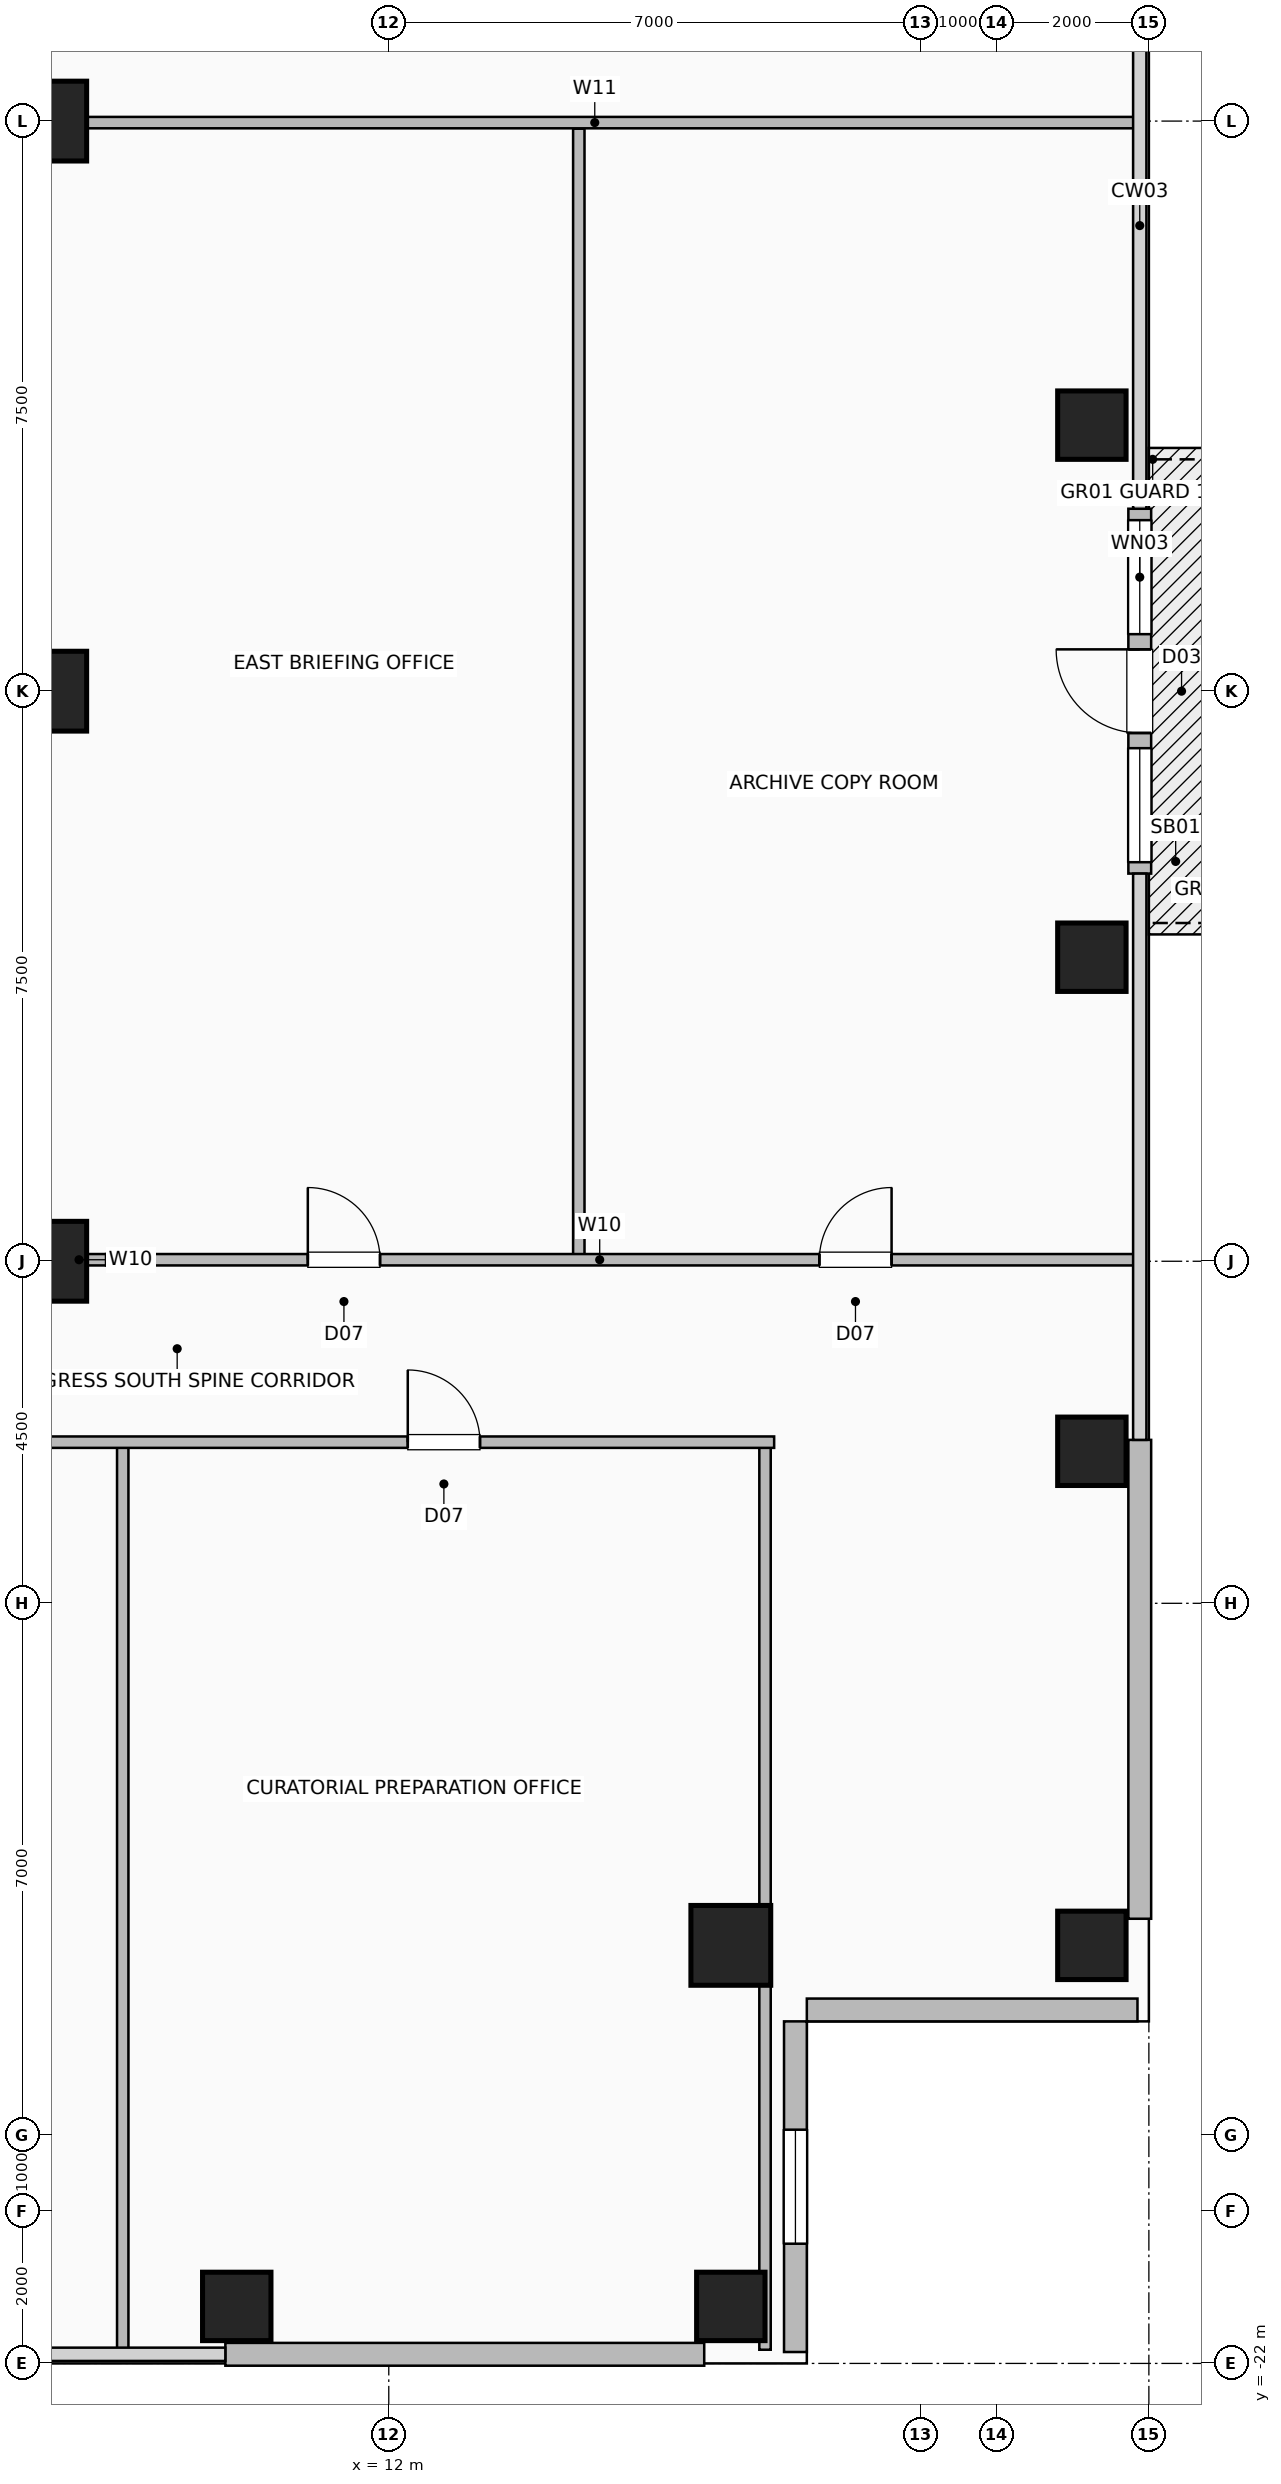
"""IFC4 building model, lengths in metres.
Left out: names, types, materials, properties, quantities, classifications, styles, units other than length and angle.
Written with IfcOpenShell. Run it as: python <this file> out.ifc"""

import sys

from ifc_helpers import new_model, si_unit, direction, frame, frame_2d, origin, origin_2d, place, context, subcontext, project, spatial, rectangle, hollow_rectangle, extrude, element, fill, save


model = new_model("IFC4")
c1 = context("Model", 3, precision=1e-05, world=origin(), true_north=direction((0.0, 1.0)))
c2 = subcontext(c1, "Body", "Model", "MODEL_VIEW")
j1 = project(units=[si_unit("LENGTHUNIT", "METRE"), si_unit("PLANEANGLEUNIT", "RADIAN")], contexts=[c1])
p1 = place(None, origin())
s1 = spatial("IfcSite", under=j1, at=p1, CompositionType="ELEMENT")
p2 = place(p1, origin())
s2 = spatial("IfcBuilding", under=s1, at=p2, CompositionType="ELEMENT")
p3 = place(p2, frame((0.0, 0.0, 144.4)))
s3 = spatial("IfcBuildingStorey", under=s2, at=p3, CompositionType="ELEMENT", Elevation=144.4)
for number, where, z_axis, x_axis in (
    (1, (7.5, -7.5, 0.0), (0.0, 0.0, 1.0), (1.0, 0.0, 0.0)),
    (2, (7.5, 0.0, 0.0), (0.0, 0.0, 1.0), (1.0, 0.0, 0.0)),
    (3, (7.5, 7.5, 0.0), (0.0, 0.0, 1.0), (1.0, 0.0, 0.0)),
):
    element("IfcColumn", number, at=place(p3, frame(where, z_axis=z_axis, x_axis=x_axis)), inside=s3, PredefinedType="COLUMN", context=c2, shape_type="SweptSolid", body=[
        extrude(hollow_rectangle(XDim=1.05, YDim=1.05, WallThickness=0.05, at=origin_2d()), origin(), (0.0, 0.0, 1.0), 3.6),
    ])
for number, where, z_axis, x_axis in (
    (4, (21.25, -16.5, 0.0), (0.0, 0.0, 1.0), (1.0, 0.0, 0.0)),
    (5, (21.25, -10.0, 0.0), (0.0, 0.0, 1.0), (1.0, 0.0, 0.0)),
    (6, (21.25, -3.5, 0.0), (0.0, 0.0, 1.0), (1.0, 0.0, 0.0)),
    (7, (21.25, 3.5, 0.0), (0.0, 0.0, 1.0), (1.0, 0.0, 0.0)),
    (8, (10.0, -21.25, 0.0), (0.0, 0.0, 1.0), (1.0, 0.0, 0.0)),
    (9, (16.5, -21.25, 0.0), (0.0, 0.0, 1.0), (1.0, 0.0, 0.0)),
):
    element("IfcColumn", number, at=place(p3, frame(where, z_axis=z_axis, x_axis=x_axis)), inside=s3, PredefinedType="COLUMN", context=c2, shape_type="SweptSolid", body=[
        extrude(hollow_rectangle(XDim=0.9, YDim=0.9, WallThickness=0.045, at=origin_2d()), origin(), (0.0, 0.0, 1.0), 3.6),
    ])
p4 = place(p3, frame((16.5, -16.5, 0.0), z_axis=(0.0, 0.0, 1.0), x_axis=(1.0, 0.0, 0.0)))
e10 = element("IfcColumn", 10, at=p4, inside=s3, PredefinedType="COLUMN", context=c2, shape_type="SweptSolid", body=[
    extrude(hollow_rectangle(XDim=1.05, YDim=1.05, WallThickness=0.05, at=origin_2d()), origin(), (0.0, 0.0, 1.0), 3.6),
])
for number, where, z_axis, x_axis in (
    (11, (9.85, -21.88, 0.0), (0.0, 0.0, 1.0), (1.0, 0.0, 0.0)),
    (12, (21.88, -16.15, 0.0), (0.0, 0.0, 1.0), (0.0, 1.0, 0.0)),
):
    element("IfcWall", number, at=place(p3, frame(where, z_axis=z_axis, x_axis=x_axis)), inside=s3, PredefinedType="SOLIDWALL", context=c2, shape_type="SweptSolid", body=[
        extrude(rectangle(XDim=6.3, YDim=0.3, at=frame_2d((3.15, 0.0))), origin(), (0.0, 0.0, 1.0), 3.36),
    ])
p5 = place(p3, frame((21.88, -2.4, 0.0), z_axis=(0.0, 0.0, 1.0), x_axis=(0.0, 1.0, 0.0)))
e13 = element("IfcWall", 13, at=p5, inside=s3, PredefinedType="SOLIDWALL", context=c2, shape_type="SweptSolid", body=[
    extrude(rectangle(XDim=4.8, YDim=0.3, at=frame_2d((2.4, 0.0))), origin(), (0.0, 0.0, 1.0), 3.36),
])
p6 = place(p5, frame((1.85, 0.0, 0.0)))
e14 = element("IfcOpeningElement", 14, at=p6, cuts=e13, PredefinedType="OPENING", context=c2, shape_type="SweptSolid", body=[
    extrude(rectangle(XDim=1.1, YDim=2.2, at=frame_2d((0.55, 1.1))), frame((0.0, 0.16, 0.0), z_axis=(0.0, -1.0, 0.0), x_axis=(1.0, 0.0, 0.0)), (0.0, 0.0, 1.0), 0.32),
])
p7 = place(p5, frame((0.15, 0.0, 0.85)))
e15 = element("IfcOpeningElement", 15, at=p7, cuts=e13, PredefinedType="OPENING", context=c2, shape_type="SweptSolid", body=[
    extrude(rectangle(XDim=1.5, YDim=1.8, at=frame_2d((0.75, 0.9))), frame((0.0, 0.16, 0.0), z_axis=(0.0, -1.0, 0.0), x_axis=(1.0, 0.0, 0.0)), (0.0, 0.0, 1.0), 0.32),
])
p8 = place(p5, frame((3.15, 0.0, 0.85)))
e16 = element("IfcOpeningElement", 16, at=p8, cuts=e13, PredefinedType="OPENING", context=c2, shape_type="SweptSolid", body=[
    extrude(rectangle(XDim=1.5, YDim=1.8, at=frame_2d((0.75, 0.9))), frame((0.0, 0.16, 0.0), z_axis=(0.0, -1.0, 0.0), x_axis=(1.0, 0.0, 0.0)), (0.0, 0.0, 1.0), 0.32),
])
p9 = place(p3, frame((17.35, -21.85, 0.0), z_axis=(0.0, 0.0, 1.0), x_axis=(0.0, 1.0, 0.0)))
e17 = element("IfcWall", 17, at=p9, inside=s3, PredefinedType="SOLIDWALL", context=c2, shape_type="SweptSolid", body=[
    extrude(rectangle(XDim=4.35, YDim=0.3, at=frame_2d((2.175, 0.0))), origin(), (0.0, 0.0, 1.0), 3.36),
])
p10 = place(p9, frame((1.425, 0.0, 0.9)))
e18 = element("IfcOpeningElement", 18, at=p10, cuts=e17, PredefinedType="OPENING", context=c2, shape_type="SweptSolid", body=[
    extrude(rectangle(XDim=1.5, YDim=1.8, at=frame_2d((0.75, 0.9))), frame((0.0, 0.16, 0.0), z_axis=(0.0, -1.0, 0.0), x_axis=(1.0, 0.0, 0.0)), (0.0, 0.0, 1.0), 0.32),
])
p11 = place(p3, frame((21.85, -17.35, 0.0), z_axis=(0.0, 0.0, 1.0), x_axis=(-1.0, 0.0, 0.0)))
e19 = element("IfcWall", 19, at=p11, inside=s3, PredefinedType="SOLIDWALL", context=c2, shape_type="SweptSolid", body=[
    extrude(rectangle(XDim=4.35, YDim=0.3, at=frame_2d((2.175, 0.0))), origin(), (0.0, 0.0, 1.0), 3.36),
])
for number, where, z_axis, x_axis in (
    (20, (8.5, -21.82, 0.0), (0.0, 0.0, 1.0), (0.0, 1.0, 0.0)),
    (21, (16.95, -21.82, 0.0), (0.0, 0.0, 1.0), (0.0, 1.0, 0.0)),
):
    element("IfcWall", number, at=place(p3, frame(where, z_axis=z_axis, x_axis=x_axis)), inside=s3, PredefinedType="PARTITIONING", context=c2, shape_type="SweptSolid", body=[
        extrude(rectangle(XDim=11.94, YDim=0.15, at=frame_2d((5.97, 0.0))), origin(), (0.0, 0.0, 1.0), 3.36),
    ])
p12 = place(p3, frame((-17.07, -9.88, 0.0), z_axis=(0.0, 0.0, 1.0), x_axis=(1.0, 0.0, 0.0)))
e22 = element("IfcWall", 22, at=p12, inside=s3, PredefinedType="PARTITIONING", context=c2, shape_type="SweptSolid", body=[
    extrude(rectangle(XDim=34.14, YDim=0.15, at=frame_2d((17.07, 0.0))), origin(), (0.0, 0.0, 1.0), 3.36),
])
p13 = place(p12, frame((11.945, 0.0, 0.0)))
e23 = element("IfcOpeningElement", 23, at=p13, cuts=e22, PredefinedType="OPENING", context=c2, shape_type="SweptSolid", body=[
    extrude(rectangle(XDim=1.8, YDim=2.08, at=frame_2d((0.9, 1.04))), frame((0.0, 0.085, 0.0), z_axis=(0.0, -1.0, 0.0), x_axis=(1.0, 0.0, 0.0)), (0.0, 0.0, 1.0), 0.17),
])
p14 = place(p12, frame((29.32, 0.0, 0.0)))
e24 = element("IfcOpeningElement", 24, at=p14, cuts=e22, PredefinedType="OPENING", context=c2, shape_type="SweptSolid", body=[
    extrude(rectangle(XDim=0.95, YDim=2.06, at=frame_2d((0.475, 1.03))), frame((0.0, 0.085, 0.0), z_axis=(0.0, -1.0, 0.0), x_axis=(1.0, 0.0, 0.0)), (0.0, 0.0, 1.0), 0.17),
])
p15 = place(p3, frame((7.45, -7.48, 0.0), z_axis=(0.0, 0.0, 1.0), x_axis=(1.0, 0.0, 0.0)))
e25 = element("IfcWall", 25, at=p15, inside=s3, PredefinedType="PARTITIONING", context=c2, shape_type="SweptSolid", body=[
    extrude(rectangle(XDim=0.95, YDim=0.15, at=frame_2d((0.475, 0.0))), origin(), (0.0, 0.0, 1.0), 3.36),
])
p16 = place(p3, frame((14.5, -7.48, 0.0), z_axis=(0.0, 0.0, 1.0), x_axis=(0.0, 1.0, 0.0)))
e26 = element("IfcWall", 26, at=p16, inside=s3, PredefinedType="PARTITIONING", context=c2, shape_type="SweptSolid", body=[
    extrude(rectangle(XDim=14.88, YDim=0.15, at=frame_2d((7.44, 0.0))), origin(), (0.0, 0.0, 1.0), 3.36),
])
p17 = place(p3, frame((8.28, -7.48, 0.0), z_axis=(0.0, 0.0, 1.0), x_axis=(1.0, 0.0, 0.0)))
e27 = element("IfcWall", 27, at=p17, inside=s3, PredefinedType="PARTITIONING", context=c2, shape_type="SweptSolid", body=[
    extrude(rectangle(XDim=13.54, YDim=0.15, at=frame_2d((6.77, 0.0))), origin(), (0.0, 0.0, 1.0), 3.36),
])
p18 = place(p17, frame((2.655, 0.0, 0.0)))
e28 = element("IfcOpeningElement", 28, at=p18, cuts=e27, PredefinedType="OPENING", context=c2, shape_type="SweptSolid", body=[
    extrude(rectangle(XDim=0.95, YDim=2.06, at=frame_2d((0.475, 1.03))), frame((0.0, 0.085, 0.0), z_axis=(0.0, -1.0, 0.0), x_axis=(1.0, 0.0, 0.0)), (0.0, 0.0, 1.0), 0.17),
])
p19 = place(p17, frame((9.385, 0.0, 0.0)))
e29 = element("IfcOpeningElement", 29, at=p19, cuts=e27, PredefinedType="OPENING", context=c2, shape_type="SweptSolid", body=[
    extrude(rectangle(XDim=0.95, YDim=2.06, at=frame_2d((0.475, 1.03))), frame((0.0, 0.085, 0.0), z_axis=(0.0, -1.0, 0.0), x_axis=(1.0, 0.0, 0.0)), (0.0, 0.0, 1.0), 0.17),
])
p20 = place(p3, frame((7.6, 7.48, 0.0), z_axis=(0.0, 0.0, 1.0), x_axis=(1.0, 0.0, 0.0)))
e30 = element("IfcWall", 30, at=p20, inside=s3, PredefinedType="PARTITIONING", context=c2, shape_type="SweptSolid", body=[
    extrude(rectangle(XDim=14.22, YDim=0.15, at=frame_2d((7.11, 0.0))), origin(), (0.0, 0.0, 1.0), 3.36),
])
p21 = place(p6, origin())
e31 = element("IfcDoor", 31, at=p21, inside=s3, OperationType="SINGLE_SWING_RIGHT", PredefinedType="DOOR", context=c2, shape_type="SweptSolid", body=[
    extrude(rectangle(XDim=1.1, YDim=2.2, at=frame_2d((0.55, 1.1))), frame((0.0, 0.025, 0.0), z_axis=(0.0, -1.0, 0.0), x_axis=(1.0, 0.0, 0.0)), (0.0, 0.0, 1.0), 0.05),
])
fill(e14, e31)
p22 = place(p7, origin())
e32 = element("IfcWindow", 32, at=p22, inside=s3, PartitioningType="SINGLE_PANEL", PredefinedType="WINDOW", context=c2, shape_type="SweptSolid", body=[
    extrude(rectangle(XDim=1.5, YDim=1.8, at=frame_2d((0.75, 0.9))), frame((0.0, 0.03, 0.0), z_axis=(0.0, -1.0, 0.0), x_axis=(1.0, 0.0, 0.0)), (0.0, 0.0, 1.0), 0.06),
])
fill(e15, e32)
p23 = place(p8, origin())
e33 = element("IfcWindow", 33, at=p23, inside=s3, PartitioningType="SINGLE_PANEL", PredefinedType="WINDOW", context=c2, shape_type="SweptSolid", body=[
    extrude(rectangle(XDim=1.5, YDim=1.8, at=frame_2d((0.75, 0.9))), frame((0.0, 0.03, 0.0), z_axis=(0.0, -1.0, 0.0), x_axis=(1.0, 0.0, 0.0)), (0.0, 0.0, 1.0), 0.06),
])
fill(e16, e33)
p24 = place(p10, origin())
e34 = element("IfcWindow", 34, at=p24, inside=s3, PartitioningType="SINGLE_PANEL", PredefinedType="WINDOW", context=c2, shape_type="SweptSolid", body=[
    extrude(rectangle(XDim=1.5, YDim=1.8, at=frame_2d((0.75, 0.9))), frame((0.0, 0.03, 0.0), z_axis=(0.0, -1.0, 0.0), x_axis=(1.0, 0.0, 0.0)), (0.0, 0.0, 1.0), 0.06),
])
fill(e18, e34)
p25 = place(p14, origin())
e35 = element("IfcDoor", 35, at=p25, inside=s3, OperationType="SINGLE_SWING_LEFT", PredefinedType="DOOR", context=c2, shape_type="SweptSolid", body=[
    extrude(rectangle(XDim=0.95, YDim=2.06, at=frame_2d((0.475, 1.03))), frame((0.0, 0.025, 0.0), z_axis=(0.0, -1.0, 0.0), x_axis=(1.0, 0.0, 0.0)), (0.0, 0.0, 1.0), 0.05),
])
fill(e24, e35)
p26 = place(p18, origin())
e36 = element("IfcDoor", 36, at=p26, inside=s3, OperationType="SINGLE_SWING_LEFT", PredefinedType="DOOR", context=c2, shape_type="SweptSolid", body=[
    extrude(rectangle(XDim=0.95, YDim=2.06, at=frame_2d((0.475, 1.03))), frame((0.0, 0.025, 0.0), z_axis=(0.0, -1.0, 0.0), x_axis=(1.0, 0.0, 0.0)), (0.0, 0.0, 1.0), 0.05),
])
fill(e28, e36)
p27 = place(p19, origin())
e37 = element("IfcDoor", 37, at=p27, inside=s3, OperationType="SINGLE_SWING_RIGHT", PredefinedType="DOOR", context=c2, shape_type="SweptSolid", body=[
    extrude(rectangle(XDim=0.95, YDim=2.06, at=frame_2d((0.475, 1.03))), frame((0.0, 0.025, 0.0), z_axis=(0.0, -1.0, 0.0), x_axis=(1.0, 0.0, 0.0)), (0.0, 0.0, 1.0), 0.05),
])
fill(e29, e37)
save(model, sys.argv[1])
